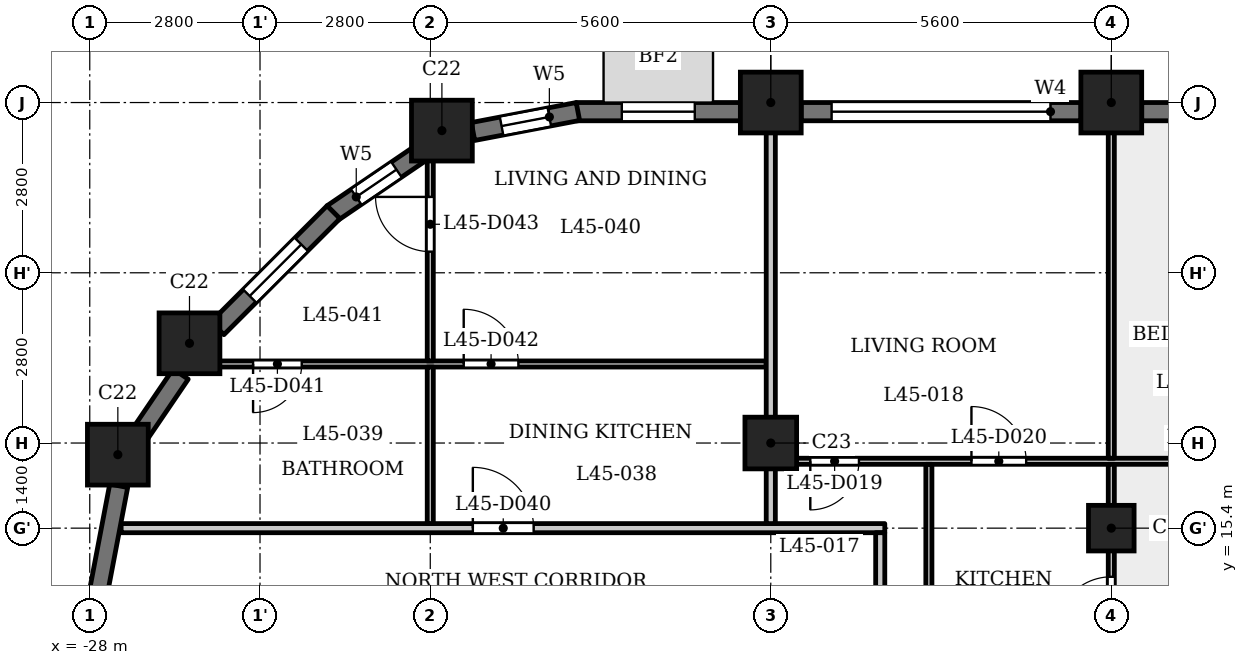
"""IFC4 building model, lengths in metres.
Left out: names, types, materials, properties, quantities, classifications, styles, units other than length and angle.
Written with IfcOpenShell. Run it as: python <this file> out.ifc"""

import sys

from ifc_helpers import new_model, si_unit, direction, frame, frame_2d, origin, origin_2d, place, context, subcontext, project, spatial, rectangle, extrude, element, fill, save


model = new_model("IFC4")
c1 = context("Model", 3, precision=1e-05, world=origin(), true_north=direction((0.0, 1.0)))
c2 = subcontext(c1, "Body", "Model", "MODEL_VIEW")
j1 = project(units=[si_unit("LENGTHUNIT", "METRE"), si_unit("PLANEANGLEUNIT", "RADIAN")], contexts=[c1])
p1 = place(None, origin())
s1 = spatial("IfcSite", under=j1, at=p1, CompositionType="ELEMENT")
p2 = place(p1, origin())
s2 = spatial("IfcBuilding", under=s1, at=p2, CompositionType="ELEMENT")
p3 = place(p2, frame((0.0, 0.0, 174.6)))
s3 = spatial("IfcBuildingStorey", under=s2, at=p3, CompositionType="ELEMENT", Elevation=174.6)
for number, where, z_axis, x_axis in (
    (1, (-11.2, 22.4, 0.0), (0.0, 0.0, 1.0), (1.0, 0.0, 0.0)),
    (2, (-16.8, 22.4, 0.0), (0.0, 0.0, 1.0), (1.0, 0.0, 0.0)),
    (3, (-22.209, 21.938, 0.0), (0.0, 0.0, 1.0), (1.0, 0.0, 0.0)),
    (4, (-26.36, 18.44, 0.0), (0.0, 0.0, 1.0), (1.0, 0.0, 0.0)),
    (5, (-27.538, 16.609, 0.0), (0.0, 0.0, 1.0), (1.0, 0.0, 0.0)),
):
    element("IfcColumn", number, at=place(p3, frame(where, z_axis=z_axis, x_axis=x_axis)), inside=s3, PredefinedType="COLUMN", context=c2, shape_type="SweptSolid", body=[
        extrude(rectangle(XDim=1.0, YDim=1.0, at=origin_2d()), origin(), (0.0, 0.0, 1.0), 3.5),
    ])
p4 = place(p3, frame((-16.8, 16.8, 0.0), z_axis=(0.0, 0.0, 1.0), x_axis=(1.0, 0.0, 0.0)))
e6 = element("IfcColumn", 6, at=p4, inside=s3, PredefinedType="COLUMN", context=c2, shape_type="SweptSolid", body=[
    extrude(rectangle(XDim=0.85, YDim=0.85, at=origin_2d()), origin(), (0.0, 0.0, 1.0), 3.5),
])
p5 = place(p3, frame((-11.2, 15.4, 0.0), z_axis=(0.0, 0.0, 1.0), x_axis=(1.0, 0.0, 0.0)))
e7 = element("IfcColumn", 7, at=p5, inside=s3, PredefinedType="COLUMN", context=c2, shape_type="SweptSolid", body=[
    extrude(rectangle(XDim=0.75, YDim=0.75, at=origin_2d()), origin(), (0.0, 0.0, 1.0), 3.5),
])
p6 = place(p3, frame((-6.1, 22.25, 0.0), z_axis=(0.0, 0.0, 1.0), x_axis=(-1.0, 0.0, 0.0)))
e8 = element("IfcWall", 8, at=p6, inside=s3, PredefinedType="SOLIDWALL", context=c2, shape_type="SweptSolid", body=[
    extrude(rectangle(XDim=4.6, YDim=0.3, at=frame_2d((2.3, 0.0))), origin(), (0.0, 0.0, 1.0), 2.4),
])
p7 = place(p6, frame((0.512, 0.0, 0.6)))
e9 = element("IfcOpeningElement", 9, at=p7, cuts=e8, PredefinedType="OPENING", context=c2, shape_type="SweptSolid", body=[
    extrude(rectangle(XDim=1.2, YDim=1.55, at=frame_2d((0.6, 0.775))), frame((0.0, 0.16, 0.0), z_axis=(0.0, -1.0, 0.0), x_axis=(1.0, 0.0, 0.0)), (0.0, 0.0, 1.0), 0.32),
])
p8 = place(p6, frame((2.887, 0.0, 0.6)))
e10 = element("IfcOpeningElement", 10, at=p8, cuts=e8, PredefinedType="OPENING", context=c2, shape_type="SweptSolid", body=[
    extrude(rectangle(XDim=1.2, YDim=1.55, at=frame_2d((0.6, 0.775))), frame((0.0, 0.16, 0.0), z_axis=(0.0, -1.0, 0.0), x_axis=(1.0, 0.0, 0.0)), (0.0, 0.0, 1.0), 0.32),
])
p9 = place(p3, frame((-11.7, 22.25, 0.0), z_axis=(0.0, 0.0, 1.0), x_axis=(-1.0, 0.0, 0.0)))
e11 = element("IfcWall", 11, at=p9, inside=s3, PredefinedType="SOLIDWALL", context=c2, shape_type="SweptSolid", body=[
    extrude(rectangle(XDim=4.6, YDim=0.3, at=frame_2d((2.3, 0.0))), origin(), (0.0, 0.0, 1.0), 2.4),
])
p10 = place(p9, frame((0.5, 0.0, 1.2)))
e12 = element("IfcOpeningElement", 12, at=p10, cuts=e11, PredefinedType="OPENING", context=c2, shape_type="SweptSolid", body=[
    extrude(rectangle(XDim=3.6, YDim=0.95, at=frame_2d((1.8, 0.475))), frame((0.0, 0.16, 0.0), z_axis=(0.0, -1.0, 0.0), x_axis=(1.0, 0.0, 0.0)), (0.0, 0.0, 1.0), 0.32),
])
p11 = place(p3, frame((-17.3, 22.25, 0.0), z_axis=(0.0, 0.0, 1.0), x_axis=(-1.0, 0.0, 0.0)))
e13 = element("IfcWall", 13, at=p11, inside=s3, PredefinedType="SOLIDWALL", context=c2, shape_type="SweptSolid", body=[
    extrude(rectangle(XDim=2.7, YDim=0.3, at=frame_2d((1.35, 0.0))), origin(), (0.0, 0.0, 1.0), 2.4),
])
p12 = place(p11, frame((0.75, 0.0, 0.6)))
e14 = element("IfcOpeningElement", 14, at=p12, cuts=e13, PredefinedType="OPENING", context=c2, shape_type="SweptSolid", body=[
    extrude(rectangle(XDim=1.2, YDim=1.55, at=frame_2d((0.6, 0.775))), frame((0.0, 0.16, 0.0), z_axis=(0.0, -1.0, 0.0), x_axis=(1.0, 0.0, 0.0)), (0.0, 0.0, 1.0), 0.32),
])
p13 = place(p3, frame((-19.972, 22.253, 0.0), z_axis=(0.0, 0.0, 1.0), x_axis=(-0.982284988433, -0.187393173565, 0.0)))
e15 = element("IfcWall", 15, at=p13, inside=s3, PredefinedType="SOLIDWALL", context=c2, shape_type="SweptSolid", body=[
    extrude(rectangle(XDim=1.756, YDim=0.3, at=frame_2d((0.878, 0.0))), origin(), (0.0, 0.0, 1.0), 2.4),
])
p14 = place(p13, frame((0.478, 0.0, 0.6)))
e16 = element("IfcOpeningElement", 16, at=p14, cuts=e15, PredefinedType="OPENING", context=c2, shape_type="SweptSolid", body=[
    extrude(rectangle(XDim=0.8, YDim=1.55, at=frame_2d((0.4, 0.775))), frame((0.0, 0.16, 0.0), z_axis=(0.0, -1.0, 0.0), x_axis=(1.0, 0.0, 0.0)), (0.0, 0.0, 1.0), 0.32),
])
p15 = place(p3, frame((-22.56, 21.566, 0.0), z_axis=(0.0, 0.0, 1.0), x_axis=(-0.82707645233, -0.562089443061, 0.0)))
e17 = element("IfcWall", 17, at=p15, inside=s3, PredefinedType="SOLIDWALL", context=c2, shape_type="SweptSolid", body=[
    extrude(rectangle(XDim=1.756, YDim=0.3, at=frame_2d((0.878, 0.0))), origin(), (0.0, 0.0, 1.0), 2.4),
])
p16 = place(p15, frame((0.478, 0.0, 0.6)))
e18 = element("IfcOpeningElement", 18, at=p16, cuts=e17, PredefinedType="OPENING", context=c2, shape_type="SweptSolid", body=[
    extrude(rectangle(XDim=0.8, YDim=1.55, at=frame_2d((0.4, 0.775))), frame((0.0, 0.16, 0.0), z_axis=(0.0, -1.0, 0.0), x_axis=(1.0, 0.0, 0.0)), (0.0, 0.0, 1.0), 0.32),
])
p17 = place(p3, frame((-23.991, 20.597, 0.0), z_axis=(0.0, 0.0, 1.0), x_axis=(-0.707106781187, -0.707106781187, 0.0)))
e19 = element("IfcWall", 19, at=p17, inside=s3, PredefinedType="SOLIDWALL", context=c2, shape_type="SweptSolid", body=[
    extrude(rectangle(XDim=2.7, YDim=0.3, at=frame_2d((1.35, 0.0))), origin(), (0.0, 0.0, 1.0), 2.4),
])
p18 = place(p17, frame((0.75, 0.0, 0.6)))
e20 = element("IfcOpeningElement", 20, at=p18, cuts=e19, PredefinedType="OPENING", context=c2, shape_type="SweptSolid", body=[
    extrude(rectangle(XDim=1.2, YDim=1.55, at=frame_2d((0.6, 0.775))), frame((0.0, 0.16, 0.0), z_axis=(0.0, -1.0, 0.0), x_axis=(1.0, 0.0, 0.0)), (0.0, 0.0, 1.0), 0.32),
])
p19 = place(p3, frame((-26.504, 17.934, 0.0), z_axis=(0.0, 0.0, 1.0), x_axis=(-0.562145470373, -0.827038372833, 0.0)))
e21 = element("IfcWall", 21, at=p19, inside=s3, PredefinedType="SOLIDWALL", context=c2, shape_type="SweptSolid", body=[
    extrude(rectangle(XDim=1.177, YDim=0.3, at=frame_2d((0.588, 0.0))), origin(), (0.0, 0.0, 1.0), 3.15),
])
p20 = place(p3, frame((-27.524, 16.097, 0.0), z_axis=(0.0, 0.0, 1.0), x_axis=(-0.187259034321, -0.982310569049, 0.0)))
e22 = element("IfcWall", 22, at=p20, inside=s3, PredefinedType="SOLIDWALL", context=c2, shape_type="SweptSolid", body=[
    extrude(rectangle(XDim=1.756, YDim=0.3, at=frame_2d((0.878, 0.0))), origin(), (0.0, 0.0, 1.0), 2.4),
])
p21 = place(p3, frame((-27.484, 15.4, 0.0), z_axis=(0.0, 0.0, 1.0), x_axis=(1.0, 0.0, 0.0)))
e23 = element("IfcWall", 23, at=p21, inside=s3, PredefinedType="PARTITIONING", context=c2, shape_type="SweptSolid", body=[
    extrude(rectangle(XDim=12.559, YDim=0.15, at=frame_2d((6.279, 0.0))), origin(), (0.0, 0.0, 1.0), 3.15),
])
p22 = place(p21, frame((5.784, 0.0, 0.0)))
e24 = element("IfcOpeningElement", 24, at=p22, cuts=e23, PredefinedType="OPENING", context=c2, shape_type="SweptSolid", body=[
    extrude(rectangle(XDim=1.0, YDim=2.1, at=frame_2d((0.5, 1.05))), frame((0.0, 0.085, 0.0), z_axis=(0.0, -1.0, 0.0), x_axis=(1.0, 0.0, 0.0)), (0.0, 0.0, 1.0), 0.17),
])
p23 = place(p3, frame((-16.725, 16.5, 0.0), z_axis=(0.0, 0.0, 1.0), x_axis=(1.0, 0.0, 0.0)))
e25 = element("IfcWall", 25, at=p23, inside=s3, PredefinedType="PARTITIONING", context=c2, shape_type="SweptSolid", body=[
    extrude(rectangle(XDim=33.45, YDim=0.1, at=frame_2d((16.725, 0.0))), origin(), (0.0, 0.0, 1.0), 3.15),
])
p24 = place(p23, frame((0.575, 0.0, 0.0)))
e26 = element("IfcOpeningElement", 26, at=p24, cuts=e25, PredefinedType="OPENING", context=c2, shape_type="SweptSolid", body=[
    extrude(rectangle(XDim=0.8, YDim=2.1, at=frame_2d((0.4, 1.05))), frame((0.0, 0.06, 0.0), z_axis=(0.0, -1.0, 0.0), x_axis=(1.0, 0.0, 0.0)), (0.0, 0.0, 1.0), 0.12),
])
p25 = place(p23, frame((3.225, 0.0, 0.0)))
e27 = element("IfcOpeningElement", 27, at=p25, cuts=e25, PredefinedType="OPENING", context=c2, shape_type="SweptSolid", body=[
    extrude(rectangle(XDim=0.9, YDim=2.1, at=frame_2d((0.45, 1.05))), frame((0.0, 0.06, 0.0), z_axis=(0.0, -1.0, 0.0), x_axis=(1.0, 0.0, 0.0)), (0.0, 0.0, 1.0), 0.12),
])
p26 = place(p23, frame((6.775, 0.0, 0.0)))
e28 = element("IfcOpeningElement", 28, at=p26, cuts=e25, PredefinedType="OPENING", context=c2, shape_type="SweptSolid", body=[
    extrude(rectangle(XDim=0.9, YDim=2.1, at=frame_2d((0.45, 1.05))), frame((0.0, 0.06, 0.0), z_axis=(0.0, -1.0, 0.0), x_axis=(1.0, 0.0, 0.0)), (0.0, 0.0, 1.0), 0.12),
])
p27 = place(p23, frame((8.825, 0.0, 0.0)))
e29 = element("IfcOpeningElement", 29, at=p27, cuts=e25, PredefinedType="OPENING", context=c2, shape_type="SweptSolid", body=[
    extrude(rectangle(XDim=0.9, YDim=2.1, at=frame_2d((0.45, 1.05))), frame((0.0, 0.06, 0.0), z_axis=(0.0, -1.0, 0.0), x_axis=(1.0, 0.0, 0.0)), (0.0, 0.0, 1.0), 0.12),
])
p28 = place(p23, frame((20.775, 0.0, 0.0)))
e30 = element("IfcOpeningElement", 30, at=p28, cuts=e25, PredefinedType="OPENING", context=c2, shape_type="SweptSolid", body=[
    extrude(rectangle(XDim=0.8, YDim=2.1, at=frame_2d((0.4, 1.05))), frame((0.0, 0.06, 0.0), z_axis=(0.0, -1.0, 0.0), x_axis=(1.0, 0.0, 0.0)), (0.0, 0.0, 1.0), 0.12),
])
p29 = place(p23, frame((17.325, 0.0, 0.0)))
e31 = element("IfcOpeningElement", 31, at=p29, cuts=e25, PredefinedType="OPENING", context=c2, shape_type="SweptSolid", body=[
    extrude(rectangle(XDim=0.9, YDim=2.1, at=frame_2d((0.45, 1.05))), frame((0.0, 0.06, 0.0), z_axis=(0.0, -1.0, 0.0), x_axis=(1.0, 0.0, 0.0)), (0.0, 0.0, 1.0), 0.12),
])
p30 = place(p23, frame((12.375, 0.0, 0.0)))
e32 = element("IfcOpeningElement", 32, at=p30, cuts=e25, PredefinedType="OPENING", context=c2, shape_type="SweptSolid", body=[
    extrude(rectangle(XDim=0.9, YDim=2.1, at=frame_2d((0.45, 1.05))), frame((0.0, 0.06, 0.0), z_axis=(0.0, -1.0, 0.0), x_axis=(1.0, 0.0, 0.0)), (0.0, 0.0, 1.0), 0.12),
])
p31 = place(p23, frame((14.425, 0.0, 0.0)))
e33 = element("IfcOpeningElement", 33, at=p31, cuts=e25, PredefinedType="OPENING", context=c2, shape_type="SweptSolid", body=[
    extrude(rectangle(XDim=0.9, YDim=2.1, at=frame_2d((0.45, 1.05))), frame((0.0, 0.06, 0.0), z_axis=(0.0, -1.0, 0.0), x_axis=(1.0, 0.0, 0.0)), (0.0, 0.0, 1.0), 0.12),
])
p32 = place(p23, frame((26.575, 0.0, 0.0)))
e34 = element("IfcOpeningElement", 34, at=p32, cuts=e25, PredefinedType="OPENING", context=c2, shape_type="SweptSolid", body=[
    extrude(rectangle(XDim=0.8, YDim=2.1, at=frame_2d((0.4, 1.05))), frame((0.0, 0.06, 0.0), z_axis=(0.0, -1.0, 0.0), x_axis=(1.0, 0.0, 0.0)), (0.0, 0.0, 1.0), 0.12),
])
p33 = place(p23, frame((23.775, 0.0, 0.0)))
e35 = element("IfcOpeningElement", 35, at=p33, cuts=e25, PredefinedType="OPENING", context=c2, shape_type="SweptSolid", body=[
    extrude(rectangle(XDim=0.9, YDim=2.1, at=frame_2d((0.45, 1.05))), frame((0.0, 0.06, 0.0), z_axis=(0.0, -1.0, 0.0), x_axis=(1.0, 0.0, 0.0)), (0.0, 0.0, 1.0), 0.12),
])
p34 = place(p23, frame((32.075, 0.0, 0.0)))
e36 = element("IfcOpeningElement", 36, at=p34, cuts=e25, PredefinedType="OPENING", context=c2, shape_type="SweptSolid", body=[
    extrude(rectangle(XDim=0.8, YDim=2.1, at=frame_2d((0.4, 1.05))), frame((0.0, 0.06, 0.0), z_axis=(0.0, -1.0, 0.0), x_axis=(1.0, 0.0, 0.0)), (0.0, 0.0, 1.0), 0.12),
])
p35 = place(p23, frame((29.375, 0.0, 0.0)))
e37 = element("IfcOpeningElement", 37, at=p35, cuts=e25, PredefinedType="OPENING", context=c2, shape_type="SweptSolid", body=[
    extrude(rectangle(XDim=0.9, YDim=2.1, at=frame_2d((0.45, 1.05))), frame((0.0, 0.06, 0.0), z_axis=(0.0, -1.0, 0.0), x_axis=(1.0, 0.0, 0.0)), (0.0, 0.0, 1.0), 0.12),
])
p36 = place(p3, frame((-26.44, 18.1, 0.0), z_axis=(0.0, 0.0, 1.0), x_axis=(1.0, 0.0, 0.0)))
e38 = element("IfcWall", 38, at=p36, inside=s3, PredefinedType="PARTITIONING", context=c2, shape_type="SweptSolid", body=[
    extrude(rectangle(XDim=9.565, YDim=0.1, at=frame_2d((4.782, 0.0))), origin(), (0.0, 0.0, 1.0), 3.15),
])
p37 = place(p36, frame((1.126, 0.0, 0.0)))
e39 = element("IfcOpeningElement", 39, at=p37, cuts=e38, PredefinedType="OPENING", context=c2, shape_type="SweptSolid", body=[
    extrude(rectangle(XDim=0.8, YDim=2.1, at=frame_2d((0.4, 1.05))), frame((0.0, 0.06, 0.0), z_axis=(0.0, -1.0, 0.0), x_axis=(1.0, 0.0, 0.0)), (0.0, 0.0, 1.0), 0.12),
])
p38 = place(p36, frame((4.59, 0.0, 0.0)))
e40 = element("IfcOpeningElement", 40, at=p38, cuts=e38, PredefinedType="OPENING", context=c2, shape_type="SweptSolid", body=[
    extrude(rectangle(XDim=0.9, YDim=2.1, at=frame_2d((0.45, 1.05))), frame((0.0, 0.06, 0.0), z_axis=(0.0, -1.0, 0.0), x_axis=(1.0, 0.0, 0.0)), (0.0, 0.0, 1.0), 0.12),
])
p39 = place(p3, frame((-22.4, 15.475, 0.0), z_axis=(0.0, 0.0, 1.0), x_axis=(0.0, 1.0, 0.0)))
e41 = element("IfcWall", 41, at=p39, inside=s3, PredefinedType="PARTITIONING", context=c2, shape_type="SweptSolid", body=[
    extrude(rectangle(XDim=2.575, YDim=0.1, at=frame_2d((1.288, 0.0))), origin(), (0.0, 0.0, 1.0), 3.15),
])
p40 = place(p3, frame((-22.4, 18.15, 0.0), z_axis=(0.0, 0.0, 1.0), x_axis=(0.0, 1.0, 0.0)))
e42 = element("IfcWall", 42, at=p40, inside=s3, PredefinedType="PARTITIONING", context=c2, shape_type="SweptSolid", body=[
    extrude(rectangle(XDim=3.57, YDim=0.1, at=frame_2d((1.785, 0.0))), origin(), (0.0, 0.0, 1.0), 3.15),
])
p41 = place(p40, frame((1.798, 0.0, 0.0)))
e43 = element("IfcOpeningElement", 43, at=p41, cuts=e42, PredefinedType="OPENING", context=c2, shape_type="SweptSolid", body=[
    extrude(rectangle(XDim=0.9, YDim=2.1, at=frame_2d((0.45, 1.05))), frame((0.0, 0.06, 0.0), z_axis=(0.0, -1.0, 0.0), x_axis=(1.0, 0.0, 0.0)), (0.0, 0.0, 1.0), 0.12),
])
p42 = place(p3, frame((-16.8, 15.475, 0.0), z_axis=(0.0, 0.0, 1.0), x_axis=(0.0, 1.0, 0.0)))
e44 = element("IfcWall", 44, at=p42, inside=s3, PredefinedType="PARTITIONING", context=c2, shape_type="SweptSolid", body=[
    extrude(rectangle(XDim=7.405, YDim=0.15, at=frame_2d((3.702, 0.0))), origin(), (0.0, 0.0, 1.0), 3.15),
])
p43 = place(p3, frame((-15.0, 13.275, 0.0), z_axis=(0.0, 0.0, 1.0), x_axis=(0.0, 1.0, 0.0)))
e45 = element("IfcWall", 45, at=p43, inside=s3, PredefinedType="PARTITIONING", context=c2, shape_type="SweptSolid", body=[
    extrude(rectangle(XDim=2.05, YDim=0.15, at=frame_2d((1.025, 0.0))), origin(), (0.0, 0.0, 1.0), 3.15),
])
p44 = place(p3, frame((-14.2, 13.275, 0.0), z_axis=(0.0, 0.0, 1.0), x_axis=(0.0, 1.0, 0.0)))
e46 = element("IfcWall", 46, at=p44, inside=s3, PredefinedType="PARTITIONING", context=c2, shape_type="SweptSolid", body=[
    extrude(rectangle(XDim=3.175, YDim=0.1, at=frame_2d((1.587, 0.0))), origin(), (0.0, 0.0, 1.0), 3.15),
])
p45 = place(p3, frame((-11.2, 13.275, 0.0), z_axis=(0.0, 0.0, 1.0), x_axis=(0.0, 1.0, 0.0)))
e47 = element("IfcWall", 47, at=p45, inside=s3, PredefinedType="PARTITIONING", context=c2, shape_type="SweptSolid", body=[
    extrude(rectangle(XDim=3.175, YDim=0.1, at=frame_2d((1.587, 0.0))), origin(), (0.0, 0.0, 1.0), 3.15),
])
p46 = place(p45, frame((0.425, 0.0, 0.0)))
e48 = element("IfcOpeningElement", 48, at=p46, cuts=e47, PredefinedType="OPENING", context=c2, shape_type="SweptSolid", body=[
    extrude(rectangle(XDim=0.9, YDim=2.1, at=frame_2d((0.45, 1.05))), frame((0.0, 0.06, 0.0), z_axis=(0.0, -1.0, 0.0), x_axis=(1.0, 0.0, 0.0)), (0.0, 0.0, 1.0), 0.12),
])
p47 = place(p3, frame((-11.2, 16.55, 0.0), z_axis=(0.0, 0.0, 1.0), x_axis=(0.0, 1.0, 0.0)))
e49 = element("IfcWall", 49, at=p47, inside=s3, PredefinedType="PARTITIONING", context=c2, shape_type="SweptSolid", body=[
    extrude(rectangle(XDim=6.33, YDim=0.1, at=frame_2d((3.165, 0.0))), origin(), (0.0, 0.0, 1.0), 3.15),
])
p48 = place(p46, origin())
e50 = element("IfcDoor", 50, at=p48, inside=s3, OperationType="SINGLE_SWING_RIGHT", PredefinedType="DOOR", context=c2, shape_type="SweptSolid", body=[
    extrude(rectangle(XDim=0.9, YDim=2.1, at=frame_2d((0.45, 1.05))), frame((0.0, 0.025, 0.0), z_axis=(0.0, -1.0, 0.0), x_axis=(1.0, 0.0, 0.0)), (0.0, 0.0, 1.0), 0.05),
])
fill(e48, e50)
p49 = place(p24, origin())
e51 = element("IfcDoor", 51, at=p49, inside=s3, OperationType="SINGLE_SWING_LEFT", PredefinedType="DOOR", context=c2, shape_type="SweptSolid", body=[
    extrude(rectangle(XDim=0.8, YDim=2.1, at=frame_2d((0.4, 1.05))), frame((0.0, 0.025, 0.0), z_axis=(0.0, -1.0, 0.0), x_axis=(1.0, 0.0, 0.0)), (0.0, 0.0, 1.0), 0.05),
])
fill(e26, e51)
p50 = place(p25, origin())
e52 = element("IfcDoor", 52, at=p50, inside=s3, OperationType="SINGLE_SWING_RIGHT", PredefinedType="DOOR", context=c2, shape_type="SweptSolid", body=[
    extrude(rectangle(XDim=0.9, YDim=2.1, at=frame_2d((0.45, 1.05))), frame((0.0, 0.025, 0.0), z_axis=(0.0, -1.0, 0.0), x_axis=(1.0, 0.0, 0.0)), (0.0, 0.0, 1.0), 0.05),
])
fill(e27, e52)
p51 = place(p22, origin())
e53 = element("IfcDoor", 53, at=p51, inside=s3, OperationType="SINGLE_SWING_RIGHT", PredefinedType="DOOR", context=c2, shape_type="SweptSolid", body=[
    extrude(rectangle(XDim=1.0, YDim=2.1, at=frame_2d((0.5, 1.05))), frame((0.0, 0.025, 0.0), z_axis=(0.0, -1.0, 0.0), x_axis=(1.0, 0.0, 0.0)), (0.0, 0.0, 1.0), 0.05),
])
fill(e24, e53)
p52 = place(p37, origin())
e54 = element("IfcDoor", 54, at=p52, inside=s3, OperationType="SINGLE_SWING_LEFT", PredefinedType="DOOR", context=c2, shape_type="SweptSolid", body=[
    extrude(rectangle(XDim=0.8, YDim=2.1, at=frame_2d((0.4, 1.05))), frame((0.0, 0.025, 0.0), z_axis=(0.0, -1.0, 0.0), x_axis=(1.0, 0.0, 0.0)), (0.0, 0.0, 1.0), 0.05),
])
fill(e39, e54)
p53 = place(p38, origin())
e55 = element("IfcDoor", 55, at=p53, inside=s3, OperationType="SINGLE_SWING_RIGHT", PredefinedType="DOOR", context=c2, shape_type="SweptSolid", body=[
    extrude(rectangle(XDim=0.9, YDim=2.1, at=frame_2d((0.45, 1.05))), frame((0.0, 0.025, 0.0), z_axis=(0.0, -1.0, 0.0), x_axis=(1.0, 0.0, 0.0)), (0.0, 0.0, 1.0), 0.05),
])
fill(e40, e55)
p54 = place(p41, origin())
e56 = element("IfcDoor", 56, at=p54, inside=s3, OperationType="SINGLE_SWING_LEFT", PredefinedType="DOOR", context=c2, shape_type="SweptSolid", body=[
    extrude(rectangle(XDim=0.9, YDim=2.1, at=frame_2d((0.45, 1.05))), frame((0.0, 0.025, 0.0), z_axis=(0.0, -1.0, 0.0), x_axis=(1.0, 0.0, 0.0)), (0.0, 0.0, 1.0), 0.05),
])
fill(e43, e56)
p55 = place(p10, origin())
e57 = element("IfcWindow", 57, at=p55, inside=s3, PartitioningType="SINGLE_PANEL", PredefinedType="WINDOW", context=c2, shape_type="SweptSolid", body=[
    extrude(rectangle(XDim=3.6, YDim=0.95, at=frame_2d((1.8, 0.475))), frame((0.0, 0.03, 0.0), z_axis=(0.0, -1.0, 0.0), x_axis=(1.0, 0.0, 0.0)), (0.0, 0.0, 1.0), 0.06),
])
fill(e12, e57)
p56 = place(p12, origin())
e58 = element("IfcWindow", 58, at=p56, inside=s3, PartitioningType="SINGLE_PANEL", PredefinedType="WINDOW", context=c2, shape_type="SweptSolid", body=[
    extrude(rectangle(XDim=1.2, YDim=1.55, at=frame_2d((0.6, 0.775))), frame((0.0, 0.03, 0.0), z_axis=(0.0, -1.0, 0.0), x_axis=(1.0, 0.0, 0.0)), (0.0, 0.0, 1.0), 0.06),
])
fill(e14, e58)
p57 = place(p14, origin())
e59 = element("IfcWindow", 59, at=p57, inside=s3, PartitioningType="SINGLE_PANEL", PredefinedType="WINDOW", context=c2, shape_type="SweptSolid", body=[
    extrude(rectangle(XDim=0.8, YDim=1.55, at=frame_2d((0.4, 0.775))), frame((0.0, 0.03, 0.0), z_axis=(0.0, -1.0, 0.0), x_axis=(1.0, 0.0, 0.0)), (0.0, 0.0, 1.0), 0.06),
])
fill(e16, e59)
p58 = place(p16, origin())
e60 = element("IfcWindow", 60, at=p58, inside=s3, PartitioningType="SINGLE_PANEL", PredefinedType="WINDOW", context=c2, shape_type="SweptSolid", body=[
    extrude(rectangle(XDim=0.8, YDim=1.55, at=frame_2d((0.4, 0.775))), frame((0.0, 0.03, 0.0), z_axis=(0.0, -1.0, 0.0), x_axis=(1.0, 0.0, 0.0)), (0.0, 0.0, 1.0), 0.06),
])
fill(e18, e60)
p59 = place(p18, origin())
e61 = element("IfcWindow", 61, at=p59, inside=s3, PartitioningType="SINGLE_PANEL", PredefinedType="WINDOW", context=c2, shape_type="SweptSolid", body=[
    extrude(rectangle(XDim=1.2, YDim=1.55, at=frame_2d((0.6, 0.775))), frame((0.0, 0.03, 0.0), z_axis=(0.0, -1.0, 0.0), x_axis=(1.0, 0.0, 0.0)), (0.0, 0.0, 1.0), 0.06),
])
fill(e20, e61)
save(model, sys.argv[1])
